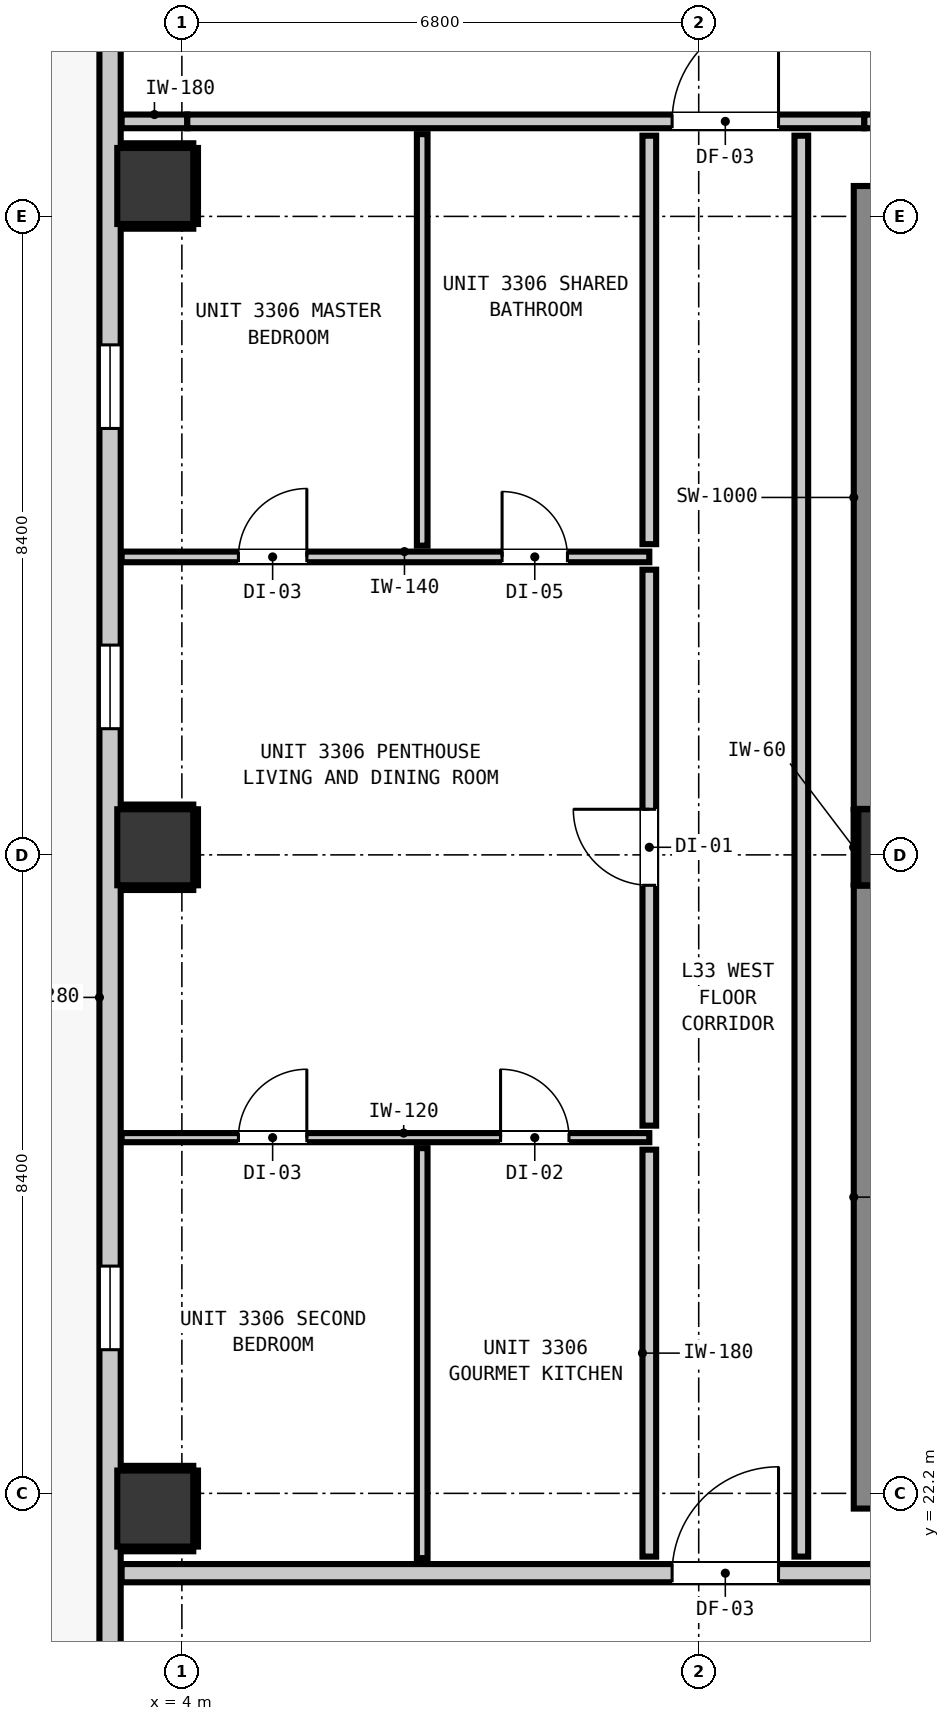
"""IFC4 building model, lengths in metres.
Left out: names, types, materials, properties, quantities, classifications, styles, units other than length and angle.
Written with IfcOpenShell. Run it as: python <this file> out.ifc"""

import sys

from ifc_helpers import new_model, si_unit, direction, frame, frame_2d, origin, origin_2d, place, context, subcontext, project, spatial, rectangle, extrude, element, fill, save


model = new_model("IFC4")
c1 = context("Model", 3, precision=1e-05, world=origin(), true_north=direction((0.0, 1.0)))
c2 = subcontext(c1, "Body", "Model", "MODEL_VIEW")
j1 = project(units=[si_unit("LENGTHUNIT", "METRE"), si_unit("PLANEANGLEUNIT", "RADIAN")], contexts=[c1])
p1 = place(None, origin())
s1 = spatial("IfcSite", under=j1, at=p1, CompositionType="ELEMENT")
p2 = place(p1, origin())
s2 = spatial("IfcBuilding", under=s1, at=p2, CompositionType="ELEMENT")
p3 = place(p2, frame((0.0, 0.0, 116.04)))
s3 = spatial("IfcBuildingStorey", under=s2, at=p3, CompositionType="ELEMENT", Elevation=116.04)
p4 = place(p3, frame((13.4, 30.7, 0.0), z_axis=(0.0, 0.0, 1.0), x_axis=(1.0, 0.0, 0.0)))
e1 = element("IfcColumn", 1, at=p4, inside=s3, PredefinedType="COLUMN", context=c2, shape_type="SweptSolid", body=[
    extrude(rectangle(XDim=1.0, YDim=1.0, at=origin_2d()), origin(), (0.0, 0.0, 1.0), 3.32),
])
p5 = place(p3, frame((13.34, 22.0, 0.0), z_axis=(0.0, 0.0, 1.0), x_axis=(0.0, 1.0, 0.0)))
e2 = element("IfcWall", 2, at=p5, inside=s3, PredefinedType="SHEAR", context=c2, shape_type="SweptSolid", body=[
    extrude(rectangle(XDim=8.195, YDim=1.0, at=frame_2d((4.098, 0.0))), origin(), (0.0, 0.0, 1.0), 3.32),
])
p6 = place(p3, frame((13.34, 31.205, 0.0), z_axis=(0.0, 0.0, 1.0), x_axis=(0.0, 1.0, 0.0)))
e3 = element("IfcWall", 3, at=p6, inside=s3, PredefinedType="SHEAR", context=c2, shape_type="SweptSolid", body=[
    extrude(rectangle(XDim=8.195, YDim=1.0, at=frame_2d((4.097, 0.0))), origin(), (0.0, 0.0, 1.0), 3.32),
])
for number, where, z_axis, x_axis in (
    (4, (3.65, 22.0, 0.0), (0.0, 0.0, 1.0), (1.0, 0.0, 0.0)),
    (5, (3.65, 30.7, 0.0), (0.0, 0.0, 1.0), (1.0, 0.0, 0.0)),
    (6, (3.65, 39.4, 0.0), (0.0, 0.0, 1.0), (1.0, 0.0, 0.0)),
):
    element("IfcColumn", number, at=place(p3, frame(where, z_axis=z_axis, x_axis=x_axis)), inside=s3, PredefinedType="COLUMN", context=c2, shape_type="SweptSolid", body=[
        extrude(rectangle(XDim=1.0, YDim=1.0, at=origin_2d()), origin(), (0.0, 0.0, 1.0), 3.32),
    ])
p7 = place(p3, frame((3.055, 11.355, 0.0), z_axis=(0.0, 0.0, 1.0), x_axis=(0.0, 1.0, 0.0)))
e7 = element("IfcWall", 7, at=p7, inside=s3, PredefinedType="STANDARD", context=c2, shape_type="SweptSolid", body=[
    extrude(rectangle(XDim=32.29, YDim=0.28, at=frame_2d((16.145, 0.0))), origin(), (0.0, 0.0, 1.0), 3.08),
])
p8 = place(p7, frame((5.818, 0.0, 0.0)))
e8 = element("IfcOpeningElement", 8, at=p8, cuts=e7, PredefinedType="OPENING", context=c2, shape_type="SweptSolid", body=[
    extrude(rectangle(XDim=1.0, YDim=2.15, at=frame_2d((0.5, 1.075))), frame((0.0, 0.15, 0.0), z_axis=(0.0, -1.0, 0.0), x_axis=(1.0, 0.0, 0.0)), (0.0, 0.0, 1.0), 0.3),
])
p9 = place(p7, frame((0.52, 0.0, 0.85)))
e9 = element("IfcOpeningElement", 9, at=p9, cuts=e7, PredefinedType="OPENING", context=c2, shape_type="SweptSolid", body=[
    extrude(rectangle(XDim=1.1, YDim=2.05, at=frame_2d((0.55, 1.025))), frame((0.0, 0.15, 0.0), z_axis=(0.0, -1.0, 0.0), x_axis=(1.0, 0.0, 0.0)), (0.0, 0.0, 1.0), 0.3),
])
p10 = place(p7, frame((20.905, 0.0, 0.85)))
e10 = element("IfcOpeningElement", 10, at=p10, cuts=e7, PredefinedType="OPENING", context=c2, shape_type="SweptSolid", body=[
    extrude(rectangle(XDim=1.1, YDim=2.05, at=frame_2d((0.55, 1.025))), frame((0.0, 0.15, 0.0), z_axis=(0.0, -1.0, 0.0), x_axis=(1.0, 0.0, 0.0)), (0.0, 0.0, 1.0), 0.3),
])
p11 = place(p7, frame((12.735, 0.0, 0.85)))
e11 = element("IfcOpeningElement", 11, at=p11, cuts=e7, PredefinedType="OPENING", context=c2, shape_type="SweptSolid", body=[
    extrude(rectangle(XDim=1.1, YDim=2.05, at=frame_2d((0.55, 1.025))), frame((0.0, 0.15, 0.0), z_axis=(0.0, -1.0, 0.0), x_axis=(1.0, 0.0, 0.0)), (0.0, 0.0, 1.0), 0.3),
])
p12 = place(p7, frame((24.855, 0.0, 0.85)))
e12 = element("IfcOpeningElement", 12, at=p12, cuts=e7, PredefinedType="OPENING", context=c2, shape_type="SweptSolid", body=[
    extrude(rectangle(XDim=1.1, YDim=2.05, at=frame_2d((0.55, 1.025))), frame((0.0, 0.15, 0.0), z_axis=(0.0, -1.0, 0.0), x_axis=(1.0, 0.0, 0.0)), (0.0, 0.0, 1.0), 0.3),
])
p13 = place(p3, frame((3.207, 21.15, 0.0), z_axis=(0.0, 0.0, 1.0), x_axis=(1.0, 0.0, 0.0)))
e13 = element("IfcWall", 13, at=p13, inside=s3, PredefinedType="PARTITIONING", context=c2, shape_type="SweptSolid", body=[
    extrude(rectangle(XDim=39.386, YDim=0.24, at=frame_2d((19.693, 0.0))), origin(), (0.0, 0.0, 1.0), 3.08),
])
p14 = place(p13, frame((15.003, 0.0, 0.0)))
e14 = element("IfcOpeningElement", 14, at=p14, cuts=e13, PredefinedType="OPENING", context=c2, shape_type="SweptSolid", body=[
    extrude(rectangle(XDim=1.1, YDim=2.15, at=frame_2d((0.55, 1.075))), frame((0.0, 0.13, 0.0), z_axis=(0.0, -1.0, 0.0), x_axis=(1.0, 0.0, 0.0)), (0.0, 0.0, 1.0), 0.26),
])
p15 = place(p13, frame((7.243, 0.0, 0.0)))
e15 = element("IfcOpeningElement", 15, at=p15, cuts=e13, PredefinedType="OPENING", context=c2, shape_type="SweptSolid", body=[
    extrude(rectangle(XDim=1.4, YDim=2.15, at=frame_2d((0.7, 1.075))), frame((0.0, 0.13, 0.0), z_axis=(0.0, -1.0, 0.0), x_axis=(1.0, 0.0, 0.0)), (0.0, 0.0, 1.0), 0.26),
])
p16 = place(p13, frame((34.843, 0.0, 0.0)))
e16 = element("IfcOpeningElement", 16, at=p16, cuts=e13, PredefinedType="OPENING", context=c2, shape_type="SweptSolid", body=[
    extrude(rectangle(XDim=1.4, YDim=2.15, at=frame_2d((0.7, 1.075))), frame((0.0, 0.13, 0.0), z_axis=(0.0, -1.0, 0.0), x_axis=(1.0, 0.0, 0.0)), (0.0, 0.0, 1.0), 0.26),
])
p17 = place(p3, frame((3.207, 40.25, 0.0), z_axis=(0.0, 0.0, 1.0), x_axis=(1.0, 0.0, 0.0)))
e17 = element("IfcWall", 17, at=p17, inside=s3, PredefinedType="PARTITIONING", context=c2, shape_type="SweptSolid", body=[
    extrude(rectangle(XDim=0.864, YDim=0.18, at=frame_2d((0.432, 0.0))), origin(), (0.0, 0.0, 1.0), 3.08),
])
p18 = place(p3, frame((4.071, 40.25, 0.0), z_axis=(0.0, 0.0, 1.0), x_axis=(1.0, 0.0, 0.0)))
e18 = element("IfcWall", 18, at=p18, inside=s3, PredefinedType="PARTITIONING", context=c2, shape_type="SweptSolid", body=[
    extrude(rectangle(XDim=8.908, YDim=0.18, at=frame_2d((4.454, 0.0))), origin(), (0.0, 0.0, 1.0), 2.565),
])
p19 = place(p18, frame((6.379, 0.0, 0.0)))
e19 = element("IfcOpeningElement", 19, at=p19, cuts=e18, PredefinedType="OPENING", context=c2, shape_type="SweptSolid", body=[
    extrude(rectangle(XDim=1.4, YDim=2.15, at=frame_2d((0.7, 1.075))), frame((0.0, 0.1, 0.0), z_axis=(0.0, -1.0, 0.0), x_axis=(1.0, 0.0, 0.0)), (0.0, 0.0, 1.0), 0.2),
])
p20 = place(p3, frame((12.979, 40.25, 0.0), z_axis=(0.0, 0.0, 1.0), x_axis=(1.0, 0.0, 0.0)))
e20 = element("IfcWall", 20, at=p20, inside=s3, PredefinedType="PARTITIONING", context=c2, shape_type="SweptSolid", body=[
    extrude(rectangle(XDim=29.614, YDim=0.18, at=frame_2d((14.807, 0.0))), origin(), (0.0, 0.0, 1.0), 3.08),
])
p21 = place(p20, frame((4.456, 0.0, 0.0)))
e21 = element("IfcOpeningElement", 21, at=p21, cuts=e20, PredefinedType="OPENING", context=c2, shape_type="SweptSolid", body=[
    extrude(rectangle(XDim=1.4, YDim=2.15, at=frame_2d((0.7, 1.075))), frame((0.0, 0.1, 0.0), z_axis=(0.0, -1.0, 0.0), x_axis=(1.0, 0.0, 0.0)), (0.0, 0.0, 1.0), 0.2),
])
p22 = place(p20, frame((25.071, 0.0, 0.0)))
e22 = element("IfcOpeningElement", 22, at=p22, cuts=e20, PredefinedType="OPENING", context=c2, shape_type="SweptSolid", body=[
    extrude(rectangle(XDim=1.4, YDim=2.15, at=frame_2d((0.7, 1.075))), frame((0.0, 0.1, 0.0), z_axis=(0.0, -1.0, 0.0), x_axis=(1.0, 0.0, 0.0)), (0.0, 0.0, 1.0), 0.2),
])
p23 = place(p3, frame((3.207, 34.52, 0.0), z_axis=(0.0, 0.0, 1.0), x_axis=(1.0, 0.0, 0.0)))
e23 = element("IfcWall", 23, at=p23, inside=s3, PredefinedType="PARTITIONING", context=c2, shape_type="SweptSolid", body=[
    extrude(rectangle(XDim=6.943, YDim=0.14, at=frame_2d((3.471, 0.0))), origin(), (0.0, 0.0, 1.0), 3.08),
])
p24 = place(p23, frame((5.006, 0.0, 0.0)))
e24 = element("IfcOpeningElement", 24, at=p24, cuts=e23, PredefinedType="OPENING", context=c2, shape_type="SweptSolid", body=[
    extrude(rectangle(XDim=0.86, YDim=2.02, at=frame_2d((0.43, 1.01))), frame((0.0, 0.08, 0.0), z_axis=(0.0, -1.0, 0.0), x_axis=(1.0, 0.0, 0.0)), (0.0, 0.0, 1.0), 0.16),
])
p25 = place(p23, frame((1.537, 0.0, 0.0)))
e25 = element("IfcOpeningElement", 25, at=p25, cuts=e23, PredefinedType="OPENING", context=c2, shape_type="SweptSolid", body=[
    extrude(rectangle(XDim=0.9, YDim=2.1, at=frame_2d((0.45, 1.05))), frame((0.0, 0.08, 0.0), z_axis=(0.0, -1.0, 0.0), x_axis=(1.0, 0.0, 0.0)), (0.0, 0.0, 1.0), 0.16),
])
p26 = place(p3, frame((3.207, 26.88, 0.0), z_axis=(0.0, 0.0, 1.0), x_axis=(1.0, 0.0, 0.0)))
e26 = element("IfcWall", 26, at=p26, inside=s3, PredefinedType="PARTITIONING", context=c2, shape_type="SweptSolid", body=[
    extrude(rectangle(XDim=6.943, YDim=0.12, at=frame_2d((3.471, 0.0))), origin(), (0.0, 0.0, 1.0), 3.08),
])
p27 = place(p26, frame((4.986, 0.0, 0.0)))
e27 = element("IfcOpeningElement", 27, at=p27, cuts=e26, PredefinedType="OPENING", context=c2, shape_type="SweptSolid", body=[
    extrude(rectangle(XDim=0.9, YDim=2.1, at=frame_2d((0.45, 1.05))), frame((0.0, 0.07, 0.0), z_axis=(0.0, -1.0, 0.0), x_axis=(1.0, 0.0, 0.0)), (0.0, 0.0, 1.0), 0.14),
])
p28 = place(p26, frame((1.537, 0.0, 0.0)))
e28 = element("IfcOpeningElement", 28, at=p28, cuts=e26, PredefinedType="OPENING", context=c2, shape_type="SweptSolid", body=[
    extrude(rectangle(XDim=0.9, YDim=2.1, at=frame_2d((0.45, 1.05))), frame((0.0, 0.07, 0.0), z_axis=(0.0, -1.0, 0.0), x_axis=(1.0, 0.0, 0.0)), (0.0, 0.0, 1.0), 0.14),
])
p29 = place(p3, frame((10.15, 21.368, 0.0), z_axis=(0.0, 0.0, 1.0), x_axis=(0.0, 1.0, 0.0)))
e29 = element("IfcWall", 29, at=p29, inside=s3, PredefinedType="PARTITIONING", context=c2, shape_type="SweptSolid", body=[
    extrude(rectangle(XDim=5.354, YDim=0.18, at=frame_2d((2.677, 0.0))), origin(), (0.0, 0.0, 1.0), 3.08),
])
p30 = place(p3, frame((10.15, 27.038, 0.0), z_axis=(0.0, 0.0, 1.0), x_axis=(0.0, 1.0, 0.0)))
e30 = element("IfcWall", 30, at=p30, inside=s3, PredefinedType="PARTITIONING", context=c2, shape_type="SweptSolid", body=[
    extrude(rectangle(XDim=7.314, YDim=0.18, at=frame_2d((3.657, 0.0))), origin(), (0.0, 0.0, 1.0), 3.08),
])
p31 = place(p30, frame((3.162, 0.0, 0.0)))
e31 = element("IfcOpeningElement", 31, at=p31, cuts=e30, PredefinedType="OPENING", context=c2, shape_type="SweptSolid", body=[
    extrude(rectangle(XDim=1.0, YDim=2.15, at=frame_2d((0.5, 1.075))), frame((0.0, 0.1, 0.0), z_axis=(0.0, -1.0, 0.0), x_axis=(1.0, 0.0, 0.0)), (0.0, 0.0, 1.0), 0.2),
])
p32 = place(p3, frame((10.15, 34.688, 0.0), z_axis=(0.0, 0.0, 1.0), x_axis=(0.0, 1.0, 0.0)))
e32 = element("IfcWall", 32, at=p32, inside=s3, PredefinedType="PARTITIONING", context=c2, shape_type="SweptSolid", body=[
    extrude(rectangle(XDim=5.374, YDim=0.18, at=frame_2d((2.687, 0.0))), origin(), (0.0, 0.0, 1.0), 3.08),
])
p33 = place(p3, frame((12.15, 21.368, 0.0), z_axis=(0.0, 0.0, 1.0), x_axis=(0.0, 1.0, 0.0)))
e33 = element("IfcWall", 33, at=p33, inside=s3, PredefinedType="PARTITIONING", context=c2, shape_type="SweptSolid", body=[
    extrude(rectangle(XDim=18.694, YDim=0.18, at=frame_2d((9.347, 0.0))), origin(), (0.0, 0.0, 1.0), 3.08),
])
p34 = place(p3, frame((7.162, 21.348, 0.0), z_axis=(0.0, 0.0, 1.0), x_axis=(0.0, 1.0, 0.0)))
e34 = element("IfcWall", 34, at=p34, inside=s3, PredefinedType="PARTITIONING", context=c2, shape_type="SweptSolid", body=[
    extrude(rectangle(XDim=5.394, YDim=0.14, at=frame_2d((2.697, 0.0))), origin(), (0.0, 0.0, 1.0), 3.08),
])
p35 = place(p3, frame((7.162, 34.668, 0.0), z_axis=(0.0, 0.0, 1.0), x_axis=(0.0, 1.0, 0.0)))
e35 = element("IfcWall", 35, at=p35, inside=s3, PredefinedType="PARTITIONING", context=c2, shape_type="SweptSolid", body=[
    extrude(rectangle(XDim=5.414, YDim=0.14, at=frame_2d((2.707, 0.0))), origin(), (0.0, 0.0, 1.0), 3.08),
])
p36 = place(p3, frame((12.868, 30.21, 0.0), z_axis=(0.0, 0.0, 1.0), x_axis=(0.0, 1.0, 0.0)))
e36 = element("IfcWall", 36, at=p36, inside=s3, PredefinedType="PARTITIONING", context=c2, shape_type="SweptSolid", body=[
    extrude(rectangle(XDim=0.98, YDim=0.06, at=frame_2d((0.49, 0.0))), origin(), (0.0, 0.0, 1.0), 1.45),
])
for number, where, z_axis, x_axis in (
    (37, (3.21, 21.468, 0.0), (0.0, 0.0, 1.0), (1.0, 0.0, 0.0)),
    (38, (3.21, 22.532, 0.0), (0.0, 0.0, 1.0), (1.0, 0.0, 0.0)),
):
    element("IfcWall", number, at=place(p3, frame(where, z_axis=z_axis, x_axis=x_axis)), inside=s3, PredefinedType="PARTITIONING", context=c2, shape_type="SweptSolid", body=[
        extrude(rectangle(XDim=0.94, YDim=0.06, at=frame_2d((0.47, 0.0))), origin(), (0.0, 0.0, 1.0), 1.45),
    ])
p37 = place(p3, frame((4.182, 21.5, 0.0), z_axis=(0.0, 0.0, 1.0), x_axis=(0.0, 1.0, 0.0)))
e39 = element("IfcWall", 39, at=p37, inside=s3, PredefinedType="PARTITIONING", context=c2, shape_type="SweptSolid", body=[
    extrude(rectangle(XDim=1.0, YDim=0.06, at=frame_2d((0.5, 0.0))), origin(), (0.0, 0.0, 1.0), 1.45),
])
for number, where, z_axis, x_axis in (
    (40, (3.21, 30.168, 0.0), (0.0, 0.0, 1.0), (1.0, 0.0, 0.0)),
    (41, (3.21, 31.232, 0.0), (0.0, 0.0, 1.0), (1.0, 0.0, 0.0)),
):
    element("IfcWall", number, at=place(p3, frame(where, z_axis=z_axis, x_axis=x_axis)), inside=s3, PredefinedType="PARTITIONING", context=c2, shape_type="SweptSolid", body=[
        extrude(rectangle(XDim=0.94, YDim=0.06, at=frame_2d((0.47, 0.0))), origin(), (0.0, 0.0, 1.0), 1.45),
    ])
p38 = place(p3, frame((4.182, 30.2, 0.0), z_axis=(0.0, 0.0, 1.0), x_axis=(0.0, 1.0, 0.0)))
e42 = element("IfcWall", 42, at=p38, inside=s3, PredefinedType="PARTITIONING", context=c2, shape_type="SweptSolid", body=[
    extrude(rectangle(XDim=1.0, YDim=0.06, at=frame_2d((0.5, 0.0))), origin(), (0.0, 0.0, 1.0), 1.45),
])
for number, where, z_axis, x_axis in (
    (43, (3.21, 38.868, 0.0), (0.0, 0.0, 1.0), (1.0, 0.0, 0.0)),
    (44, (3.21, 39.932, 0.0), (0.0, 0.0, 1.0), (1.0, 0.0, 0.0)),
):
    element("IfcWall", number, at=place(p3, frame(where, z_axis=z_axis, x_axis=x_axis)), inside=s3, PredefinedType="PARTITIONING", context=c2, shape_type="SweptSolid", body=[
        extrude(rectangle(XDim=0.94, YDim=0.06, at=frame_2d((0.47, 0.0))), origin(), (0.0, 0.0, 1.0), 1.45),
    ])
p39 = place(p3, frame((4.182, 38.9, 0.0), z_axis=(0.0, 0.0, 1.0), x_axis=(0.0, 1.0, 0.0)))
e45 = element("IfcWall", 45, at=p39, inside=s3, PredefinedType="PARTITIONING", context=c2, shape_type="SweptSolid", body=[
    extrude(rectangle(XDim=1.0, YDim=0.06, at=frame_2d((0.5, 0.0))), origin(), (0.0, 0.0, 1.0), 1.45),
])
p40 = place(p10, origin())
e46 = element("IfcWindow", 46, at=p40, inside=s3, PartitioningType="SINGLE_PANEL", PredefinedType="WINDOW", context=c2, shape_type="SweptSolid", body=[
    extrude(rectangle(XDim=1.1, YDim=2.05, at=frame_2d((0.55, 1.025))), frame((0.0, 0.03, 0.0), z_axis=(0.0, -1.0, 0.0), x_axis=(1.0, 0.0, 0.0)), (0.0, 0.0, 1.0), 0.06),
])
fill(e10, e46)
p41 = place(p11, origin())
e47 = element("IfcWindow", 47, at=p41, inside=s3, PartitioningType="SINGLE_PANEL", PredefinedType="WINDOW", context=c2, shape_type="SweptSolid", body=[
    extrude(rectangle(XDim=1.1, YDim=2.05, at=frame_2d((0.55, 1.025))), frame((0.0, 0.03, 0.0), z_axis=(0.0, -1.0, 0.0), x_axis=(1.0, 0.0, 0.0)), (0.0, 0.0, 1.0), 0.06),
])
fill(e11, e47)
p42 = place(p12, origin())
e48 = element("IfcWindow", 48, at=p42, inside=s3, PartitioningType="SINGLE_PANEL", PredefinedType="WINDOW", context=c2, shape_type="SweptSolid", body=[
    extrude(rectangle(XDim=1.1, YDim=2.05, at=frame_2d((0.55, 1.025))), frame((0.0, 0.03, 0.0), z_axis=(0.0, -1.0, 0.0), x_axis=(1.0, 0.0, 0.0)), (0.0, 0.0, 1.0), 0.06),
])
fill(e12, e48)
p43 = place(p15, origin())
e49 = element("IfcDoor", 49, at=p43, inside=s3, OperationType="SINGLE_SWING_RIGHT", PredefinedType="DOOR", context=c2, shape_type="SweptSolid", body=[
    extrude(rectangle(XDim=1.4, YDim=2.15, at=frame_2d((0.7, 1.075))), frame((0.0, 0.025, 0.0), z_axis=(0.0, -1.0, 0.0), x_axis=(1.0, 0.0, 0.0)), (0.0, 0.0, 1.0), 0.05),
])
fill(e15, e49)
p44 = place(p19, origin())
e50 = element("IfcDoor", 50, at=p44, inside=s3, OperationType="SINGLE_SWING_RIGHT", PredefinedType="DOOR", context=c2, shape_type="SweptSolid", body=[
    extrude(rectangle(XDim=1.4, YDim=2.15, at=frame_2d((0.7, 1.075))), frame((0.0, 0.025, 0.0), z_axis=(0.0, -1.0, 0.0), x_axis=(1.0, 0.0, 0.0)), (0.0, 0.0, 1.0), 0.05),
])
fill(e19, e50)
p45 = place(p31, origin())
e51 = element("IfcDoor", 51, at=p45, inside=s3, OperationType="SINGLE_SWING_RIGHT", PredefinedType="DOOR", context=c2, shape_type="SweptSolid", body=[
    extrude(rectangle(XDim=1.0, YDim=2.15, at=frame_2d((0.5, 1.075))), frame((0.0, 0.025, 0.0), z_axis=(0.0, -1.0, 0.0), x_axis=(1.0, 0.0, 0.0)), (0.0, 0.0, 1.0), 0.05),
])
fill(e31, e51)
p46 = place(p27, origin())
e52 = element("IfcDoor", 52, at=p46, inside=s3, OperationType="SINGLE_SWING_LEFT", PredefinedType="DOOR", context=c2, shape_type="SweptSolid", body=[
    extrude(rectangle(XDim=0.9, YDim=2.1, at=frame_2d((0.45, 1.05))), frame((0.0, 0.025, 0.0), z_axis=(0.0, -1.0, 0.0), x_axis=(1.0, 0.0, 0.0)), (0.0, 0.0, 1.0), 0.05),
])
fill(e27, e52)
p47 = place(p28, origin())
e53 = element("IfcDoor", 53, at=p47, inside=s3, OperationType="SINGLE_SWING_RIGHT", PredefinedType="DOOR", context=c2, shape_type="SweptSolid", body=[
    extrude(rectangle(XDim=0.9, YDim=2.1, at=frame_2d((0.45, 1.05))), frame((0.0, 0.025, 0.0), z_axis=(0.0, -1.0, 0.0), x_axis=(1.0, 0.0, 0.0)), (0.0, 0.0, 1.0), 0.05),
])
fill(e28, e53)
p48 = place(p24, origin())
e54 = element("IfcDoor", 54, at=p48, inside=s3, OperationType="SINGLE_SWING_LEFT", PredefinedType="DOOR", context=c2, shape_type="SweptSolid", body=[
    extrude(rectangle(XDim=0.86, YDim=2.02, at=frame_2d((0.43, 1.01))), frame((0.0, 0.025, 0.0), z_axis=(0.0, -1.0, 0.0), x_axis=(1.0, 0.0, 0.0)), (0.0, 0.0, 1.0), 0.05),
])
fill(e24, e54)
p49 = place(p25, origin())
e55 = element("IfcDoor", 55, at=p49, inside=s3, OperationType="SINGLE_SWING_RIGHT", PredefinedType="DOOR", context=c2, shape_type="SweptSolid", body=[
    extrude(rectangle(XDim=0.9, YDim=2.1, at=frame_2d((0.45, 1.05))), frame((0.0, 0.025, 0.0), z_axis=(0.0, -1.0, 0.0), x_axis=(1.0, 0.0, 0.0)), (0.0, 0.0, 1.0), 0.05),
])
fill(e25, e55)
save(model, sys.argv[1])
